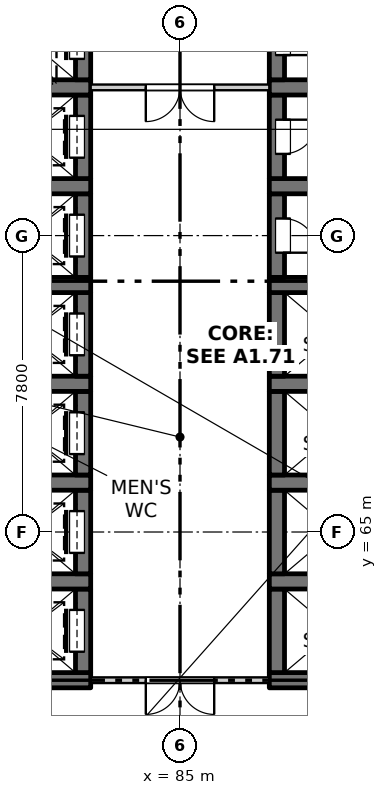
"""IFC4 building model, lengths in metres.
Left out: names, types, materials, properties, quantities, classifications, styles, units other than length and angle.
Written with IfcOpenShell. Run it as: python <this file> out.ifc"""

import sys

from ifc_helpers import new_model, si_unit, direction, frame, frame_2d, origin, place, context, subcontext, project, spatial, rectangle, extrude, element, fill, save


model = new_model("IFC4")
c1 = context("Model", 3, precision=1e-05, world=origin(), true_north=direction((0.0, 1.0)))
c2 = subcontext(c1, "Body", "Model", "MODEL_VIEW")
j1 = project(units=[si_unit("LENGTHUNIT", "METRE"), si_unit("PLANEANGLEUNIT", "RADIAN")], contexts=[c1])
p1 = place(None, origin())
s1 = spatial("IfcSite", under=j1, at=p1, CompositionType="ELEMENT")
p2 = place(p1, origin())
s2 = spatial("IfcBuilding", under=s1, at=p2, CompositionType="ELEMENT")
p3 = place(p2, frame((0.0, 0.0, 10.5)))
s3 = spatial("IfcBuildingStorey", under=s2, at=p3, CompositionType="ELEMENT", Elevation=10.5)
p4 = place(p3, frame((79.65, 61.1, -0.3), z_axis=(0.0, 0.0, 1.0), x_axis=(1.0, 0.0, 0.0)))
e1 = element("IfcWall", 1, at=p4, inside=s3, PredefinedType="SOLIDWALL", context=c2, shape_type="SweptSolid", body=[
    extrude(rectangle(XDim=3.0, YDim=0.4, at=frame_2d((1.5, 0.0))), origin(), (0.0, 0.0, 1.0), 4.45),
])
p5 = place(p3, frame((82.45, 61.3, -0.3), z_axis=(0.0, 0.0, 1.0), x_axis=(0.0, 1.0, 0.0)))
e2 = element("IfcWall", 2, at=p5, inside=s3, PredefinedType="SOLIDWALL", context=c2, shape_type="SweptSolid", body=[
    extrude(rectangle(XDim=2.2, YDim=0.4, at=frame_2d((1.1, 0.0))), origin(), (0.0, 0.0, 1.0), 4.45),
])
p6 = place(p5, frame((0.55, 0.0, 0.3)))
e3 = element("IfcOpeningElement", 3, at=p6, cuts=e2, PredefinedType="OPENING", context=c2, shape_type="SweptSolid", body=[
    extrude(rectangle(XDim=1.1, YDim=2.1, at=frame_2d((0.55, 1.05))), frame((0.0, 0.21, 0.0), z_axis=(0.0, -1.0, 0.0), x_axis=(1.0, 0.0, 0.0)), (0.0, 0.0, 1.0), 0.42),
])
p7 = place(p3, frame((79.65, 63.7, -0.3), z_axis=(0.0, 0.0, 1.0), x_axis=(1.0, 0.0, 0.0)))
e4 = element("IfcWall", 4, at=p7, inside=s3, PredefinedType="SOLIDWALL", context=c2, shape_type="SweptSolid", body=[
    extrude(rectangle(XDim=3.0, YDim=0.4, at=frame_2d((1.5, 0.0))), origin(), (0.0, 0.0, 1.0), 4.45),
])
p8 = place(p3, frame((82.45, 63.9, -0.3), z_axis=(0.0, 0.0, 1.0), x_axis=(0.0, 1.0, 0.0)))
e5 = element("IfcWall", 5, at=p8, inside=s3, PredefinedType="SOLIDWALL", context=c2, shape_type="SweptSolid", body=[
    extrude(rectangle(XDim=2.2, YDim=0.4, at=frame_2d((1.1, 0.0))), origin(), (0.0, 0.0, 1.0), 4.45),
])
p9 = place(p8, frame((0.55, 0.0, 0.3)))
e6 = element("IfcOpeningElement", 6, at=p9, cuts=e5, PredefinedType="OPENING", context=c2, shape_type="SweptSolid", body=[
    extrude(rectangle(XDim=1.1, YDim=2.1, at=frame_2d((0.55, 1.05))), frame((0.0, 0.21, 0.0), z_axis=(0.0, -1.0, 0.0), x_axis=(1.0, 0.0, 0.0)), (0.0, 0.0, 1.0), 0.42),
])
p10 = place(p3, frame((79.65, 66.3, -0.3), z_axis=(0.0, 0.0, 1.0), x_axis=(1.0, 0.0, 0.0)))
e7 = element("IfcWall", 7, at=p10, inside=s3, PredefinedType="SOLIDWALL", context=c2, shape_type="SweptSolid", body=[
    extrude(rectangle(XDim=3.0, YDim=0.4, at=frame_2d((1.5, 0.0))), origin(), (0.0, 0.0, 1.0), 4.45),
])
p11 = place(p3, frame((82.45, 66.5, -0.3), z_axis=(0.0, 0.0, 1.0), x_axis=(0.0, 1.0, 0.0)))
e8 = element("IfcWall", 8, at=p11, inside=s3, PredefinedType="SOLIDWALL", context=c2, shape_type="SweptSolid", body=[
    extrude(rectangle(XDim=2.2, YDim=0.4, at=frame_2d((1.1, 0.0))), origin(), (0.0, 0.0, 1.0), 4.45),
])
p12 = place(p11, frame((0.55, 0.0, 0.3)))
e9 = element("IfcOpeningElement", 9, at=p12, cuts=e8, PredefinedType="OPENING", context=c2, shape_type="SweptSolid", body=[
    extrude(rectangle(XDim=1.1, YDim=2.1, at=frame_2d((0.55, 1.05))), frame((0.0, 0.21, 0.0), z_axis=(0.0, -1.0, 0.0), x_axis=(1.0, 0.0, 0.0)), (0.0, 0.0, 1.0), 0.42),
])
p13 = place(p3, frame((79.65, 68.9, -0.3), z_axis=(0.0, 0.0, 1.0), x_axis=(1.0, 0.0, 0.0)))
e10 = element("IfcWall", 10, at=p13, inside=s3, PredefinedType="SOLIDWALL", context=c2, shape_type="SweptSolid", body=[
    extrude(rectangle(XDim=3.0, YDim=0.4, at=frame_2d((1.5, 0.0))), origin(), (0.0, 0.0, 1.0), 4.45),
])
p14 = place(p3, frame((82.45, 69.1, -0.3), z_axis=(0.0, 0.0, 1.0), x_axis=(0.0, 1.0, 0.0)))
e11 = element("IfcWall", 11, at=p14, inside=s3, PredefinedType="SOLIDWALL", context=c2, shape_type="SweptSolid", body=[
    extrude(rectangle(XDim=2.2, YDim=0.4, at=frame_2d((1.1, 0.0))), origin(), (0.0, 0.0, 1.0), 4.45),
])
p15 = place(p14, frame((0.55, 0.0, 0.3)))
e12 = element("IfcOpeningElement", 12, at=p15, cuts=e11, PredefinedType="OPENING", context=c2, shape_type="SweptSolid", body=[
    extrude(rectangle(XDim=1.1, YDim=2.1, at=frame_2d((0.55, 1.05))), frame((0.0, 0.21, 0.0), z_axis=(0.0, -1.0, 0.0), x_axis=(1.0, 0.0, 0.0)), (0.0, 0.0, 1.0), 0.42),
])
p16 = place(p3, frame((79.65, 71.5, -0.3), z_axis=(0.0, 0.0, 1.0), x_axis=(1.0, 0.0, 0.0)))
e13 = element("IfcWall", 13, at=p16, inside=s3, PredefinedType="SOLIDWALL", context=c2, shape_type="SweptSolid", body=[
    extrude(rectangle(XDim=3.0, YDim=0.4, at=frame_2d((1.5, 0.0))), origin(), (0.0, 0.0, 1.0), 4.45),
])
p17 = place(p3, frame((82.45, 71.7, -0.3), z_axis=(0.0, 0.0, 1.0), x_axis=(0.0, 1.0, 0.0)))
e14 = element("IfcWall", 14, at=p17, inside=s3, PredefinedType="SOLIDWALL", context=c2, shape_type="SweptSolid", body=[
    extrude(rectangle(XDim=2.2, YDim=0.4, at=frame_2d((1.1, 0.0))), origin(), (0.0, 0.0, 1.0), 4.45),
])
p18 = place(p17, frame((0.55, 0.0, 0.3)))
e15 = element("IfcOpeningElement", 15, at=p18, cuts=e14, PredefinedType="OPENING", context=c2, shape_type="SweptSolid", body=[
    extrude(rectangle(XDim=1.1, YDim=2.1, at=frame_2d((0.55, 1.05))), frame((0.0, 0.21, 0.0), z_axis=(0.0, -1.0, 0.0), x_axis=(1.0, 0.0, 0.0)), (0.0, 0.0, 1.0), 0.42),
])
p19 = place(p3, frame((79.65, 74.1, -0.3), z_axis=(0.0, 0.0, 1.0), x_axis=(1.0, 0.0, 0.0)))
e16 = element("IfcWall", 16, at=p19, inside=s3, PredefinedType="SOLIDWALL", context=c2, shape_type="SweptSolid", body=[
    extrude(rectangle(XDim=3.0, YDim=0.4, at=frame_2d((1.5, 0.0))), origin(), (0.0, 0.0, 1.0), 4.45),
])
p20 = place(p3, frame((82.45, 74.3, -0.3), z_axis=(0.0, 0.0, 1.0), x_axis=(0.0, 1.0, 0.0)))
e17 = element("IfcWall", 17, at=p20, inside=s3, PredefinedType="SOLIDWALL", context=c2, shape_type="SweptSolid", body=[
    extrude(rectangle(XDim=2.2, YDim=0.4, at=frame_2d((1.1, 0.0))), origin(), (0.0, 0.0, 1.0), 4.45),
])
p21 = place(p20, frame((0.55, 0.0, 0.3)))
e18 = element("IfcOpeningElement", 18, at=p21, cuts=e17, PredefinedType="OPENING", context=c2, shape_type="SweptSolid", body=[
    extrude(rectangle(XDim=1.1, YDim=2.1, at=frame_2d((0.55, 1.05))), frame((0.0, 0.21, 0.0), z_axis=(0.0, -1.0, 0.0), x_axis=(1.0, 0.0, 0.0)), (0.0, 0.0, 1.0), 0.42),
])
p22 = place(p3, frame((79.65, 76.7, -0.3), z_axis=(0.0, 0.0, 1.0), x_axis=(1.0, 0.0, 0.0)))
e19 = element("IfcWall", 19, at=p22, inside=s3, PredefinedType="SOLIDWALL", context=c2, shape_type="SweptSolid", body=[
    extrude(rectangle(XDim=3.0, YDim=0.4, at=frame_2d((1.5, 0.0))), origin(), (0.0, 0.0, 1.0), 4.45),
])
p23 = place(p3, frame((82.45, 76.9, -0.3), z_axis=(0.0, 0.0, 1.0), x_axis=(0.0, 1.0, 0.0)))
e20 = element("IfcWall", 20, at=p23, inside=s3, PredefinedType="SOLIDWALL", context=c2, shape_type="SweptSolid", body=[
    extrude(rectangle(XDim=2.2, YDim=0.4, at=frame_2d((1.1, 0.0))), origin(), (0.0, 0.0, 1.0), 4.45),
])
p24 = place(p23, frame((0.55, 0.0, 0.3)))
e21 = element("IfcOpeningElement", 21, at=p24, cuts=e20, PredefinedType="OPENING", context=c2, shape_type="SweptSolid", body=[
    extrude(rectangle(XDim=1.1, YDim=2.1, at=frame_2d((0.55, 1.05))), frame((0.0, 0.21, 0.0), z_axis=(0.0, -1.0, 0.0), x_axis=(1.0, 0.0, 0.0)), (0.0, 0.0, 1.0), 0.42),
])
p25 = place(p3, frame((87.35, 61.1, -0.3), z_axis=(0.0, 0.0, 1.0), x_axis=(1.0, 0.0, 0.0)))
e22 = element("IfcWall", 22, at=p25, inside=s3, PredefinedType="SOLIDWALL", context=c2, shape_type="SweptSolid", body=[
    extrude(rectangle(XDim=3.0, YDim=0.4, at=frame_2d((1.5, 0.0))), origin(), (0.0, 0.0, 1.0), 4.45),
])
p26 = place(p3, frame((87.55, 61.3, -0.3), z_axis=(0.0, 0.0, 1.0), x_axis=(0.0, 1.0, 0.0)))
e23 = element("IfcWall", 23, at=p26, inside=s3, PredefinedType="SOLIDWALL", context=c2, shape_type="SweptSolid", body=[
    extrude(rectangle(XDim=2.2, YDim=0.4, at=frame_2d((1.1, 0.0))), origin(), (0.0, 0.0, 1.0), 4.45),
])
p27 = place(p3, frame((87.35, 63.7, -0.3), z_axis=(0.0, 0.0, 1.0), x_axis=(1.0, 0.0, 0.0)))
e24 = element("IfcWall", 24, at=p27, inside=s3, PredefinedType="SOLIDWALL", context=c2, shape_type="SweptSolid", body=[
    extrude(rectangle(XDim=3.0, YDim=0.4, at=frame_2d((1.5, 0.0))), origin(), (0.0, 0.0, 1.0), 4.45),
])
p28 = place(p3, frame((87.55, 63.9, -0.3), z_axis=(0.0, 0.0, 1.0), x_axis=(0.0, 1.0, 0.0)))
e25 = element("IfcWall", 25, at=p28, inside=s3, PredefinedType="SOLIDWALL", context=c2, shape_type="SweptSolid", body=[
    extrude(rectangle(XDim=2.2, YDim=0.4, at=frame_2d((1.1, 0.0))), origin(), (0.0, 0.0, 1.0), 4.45),
])
p29 = place(p3, frame((87.35, 66.3, -0.3), z_axis=(0.0, 0.0, 1.0), x_axis=(1.0, 0.0, 0.0)))
e26 = element("IfcWall", 26, at=p29, inside=s3, PredefinedType="SOLIDWALL", context=c2, shape_type="SweptSolid", body=[
    extrude(rectangle(XDim=3.0, YDim=0.4, at=frame_2d((1.5, 0.0))), origin(), (0.0, 0.0, 1.0), 4.45),
])
p30 = place(p3, frame((87.55, 66.5, -0.3), z_axis=(0.0, 0.0, 1.0), x_axis=(0.0, 1.0, 0.0)))
e27 = element("IfcWall", 27, at=p30, inside=s3, PredefinedType="SOLIDWALL", context=c2, shape_type="SweptSolid", body=[
    extrude(rectangle(XDim=2.2, YDim=0.4, at=frame_2d((1.1, 0.0))), origin(), (0.0, 0.0, 1.0), 4.45),
])
p31 = place(p3, frame((87.35, 68.9, -0.3), z_axis=(0.0, 0.0, 1.0), x_axis=(1.0, 0.0, 0.0)))
e28 = element("IfcWall", 28, at=p31, inside=s3, PredefinedType="SOLIDWALL", context=c2, shape_type="SweptSolid", body=[
    extrude(rectangle(XDim=3.0, YDim=0.4, at=frame_2d((1.5, 0.0))), origin(), (0.0, 0.0, 1.0), 4.45),
])
p32 = place(p3, frame((87.55, 69.1, -0.3), z_axis=(0.0, 0.0, 1.0), x_axis=(0.0, 1.0, 0.0)))
e29 = element("IfcWall", 29, at=p32, inside=s3, PredefinedType="SOLIDWALL", context=c2, shape_type="SweptSolid", body=[
    extrude(rectangle(XDim=2.2, YDim=0.4, at=frame_2d((1.1, 0.0))), origin(), (0.0, 0.0, 1.0), 4.45),
])
p33 = place(p3, frame((87.35, 71.5, -0.3), z_axis=(0.0, 0.0, 1.0), x_axis=(1.0, 0.0, 0.0)))
e30 = element("IfcWall", 30, at=p33, inside=s3, PredefinedType="SOLIDWALL", context=c2, shape_type="SweptSolid", body=[
    extrude(rectangle(XDim=3.0, YDim=0.4, at=frame_2d((1.5, 0.0))), origin(), (0.0, 0.0, 1.0), 4.45),
])
p34 = place(p3, frame((87.55, 71.7, -0.3), z_axis=(0.0, 0.0, 1.0), x_axis=(0.0, 1.0, 0.0)))
e31 = element("IfcWall", 31, at=p34, inside=s3, PredefinedType="SOLIDWALL", context=c2, shape_type="SweptSolid", body=[
    extrude(rectangle(XDim=2.2, YDim=0.4, at=frame_2d((1.1, 0.0))), origin(), (0.0, 0.0, 1.0), 4.45),
])
p35 = place(p34, frame((0.65, 0.0, 0.3)))
e32 = element("IfcOpeningElement", 32, at=p35, cuts=e31, PredefinedType="OPENING", context=c2, shape_type="SweptSolid", body=[
    extrude(rectangle(XDim=0.9, YDim=2.1, at=frame_2d((0.45, 1.05))), frame((0.0, 0.21, 0.0), z_axis=(0.0, -1.0, 0.0), x_axis=(1.0, 0.0, 0.0)), (0.0, 0.0, 1.0), 0.42),
])
p36 = place(p3, frame((87.35, 74.1, -0.3), z_axis=(0.0, 0.0, 1.0), x_axis=(1.0, 0.0, 0.0)))
e33 = element("IfcWall", 33, at=p36, inside=s3, PredefinedType="SOLIDWALL", context=c2, shape_type="SweptSolid", body=[
    extrude(rectangle(XDim=3.0, YDim=0.4, at=frame_2d((1.5, 0.0))), origin(), (0.0, 0.0, 1.0), 4.45),
])
p37 = place(p3, frame((87.55, 74.3, -0.3), z_axis=(0.0, 0.0, 1.0), x_axis=(0.0, 1.0, 0.0)))
e34 = element("IfcWall", 34, at=p37, inside=s3, PredefinedType="SOLIDWALL", context=c2, shape_type="SweptSolid", body=[
    extrude(rectangle(XDim=2.2, YDim=0.4, at=frame_2d((1.1, 0.0))), origin(), (0.0, 0.0, 1.0), 4.45),
])
p38 = place(p37, frame((0.65, 0.0, 0.3)))
e35 = element("IfcOpeningElement", 35, at=p38, cuts=e34, PredefinedType="OPENING", context=c2, shape_type="SweptSolid", body=[
    extrude(rectangle(XDim=0.9, YDim=2.1, at=frame_2d((0.45, 1.05))), frame((0.0, 0.21, 0.0), z_axis=(0.0, -1.0, 0.0), x_axis=(1.0, 0.0, 0.0)), (0.0, 0.0, 1.0), 0.42),
])
p39 = place(p3, frame((87.35, 76.7, -0.3), z_axis=(0.0, 0.0, 1.0), x_axis=(1.0, 0.0, 0.0)))
e36 = element("IfcWall", 36, at=p39, inside=s3, PredefinedType="SOLIDWALL", context=c2, shape_type="SweptSolid", body=[
    extrude(rectangle(XDim=3.0, YDim=0.4, at=frame_2d((1.5, 0.0))), origin(), (0.0, 0.0, 1.0), 4.45),
])
p40 = place(p3, frame((87.55, 76.9, -0.3), z_axis=(0.0, 0.0, 1.0), x_axis=(0.0, 1.0, 0.0)))
e37 = element("IfcWall", 37, at=p40, inside=s3, PredefinedType="SOLIDWALL", context=c2, shape_type="SweptSolid", body=[
    extrude(rectangle(XDim=2.2, YDim=0.4, at=frame_2d((1.1, 0.0))), origin(), (0.0, 0.0, 1.0), 4.45),
])
p41 = place(p40, frame((0.65, 0.0, 0.3)))
e38 = element("IfcOpeningElement", 38, at=p41, cuts=e37, PredefinedType="OPENING", context=c2, shape_type="SweptSolid", body=[
    extrude(rectangle(XDim=0.9, YDim=2.1, at=frame_2d((0.45, 1.05))), frame((0.0, 0.21, 0.0), z_axis=(0.0, -1.0, 0.0), x_axis=(1.0, 0.0, 0.0)), (0.0, 0.0, 1.0), 0.42),
])
p42 = place(p3, frame((82.65, 61.1, 0.0), z_axis=(0.0, 0.0, 1.0), x_axis=(1.0, 0.0, 0.0)))
e39 = element("IfcWall", 39, at=p42, inside=s3, PredefinedType="PARTITIONING", context=c2, shape_type="SweptSolid", body=[
    extrude(rectangle(XDim=4.7, YDim=0.15, at=frame_2d((2.35, 0.0))), origin(), (0.0, 0.0, 1.0), 4.15),
])
p43 = place(p42, frame((1.45, 0.0, 0.0)))
e40 = element("IfcOpeningElement", 40, at=p43, cuts=e39, PredefinedType="OPENING", context=c2, shape_type="SweptSolid", body=[
    extrude(rectangle(XDim=1.8, YDim=2.1, at=frame_2d((0.9, 1.05))), frame((0.0, 0.085, 0.0), z_axis=(0.0, -1.0, 0.0), x_axis=(1.0, 0.0, 0.0)), (0.0, 0.0, 1.0), 0.17),
])
p44 = place(p3, frame((82.65, 76.7, 0.0), z_axis=(0.0, 0.0, 1.0), x_axis=(1.0, 0.0, 0.0)))
e41 = element("IfcWall", 41, at=p44, inside=s3, PredefinedType="PARTITIONING", context=c2, shape_type="SweptSolid", body=[
    extrude(rectangle(XDim=4.7, YDim=0.15, at=frame_2d((2.35, 0.0))), origin(), (0.0, 0.0, 1.0), 4.15),
])
p45 = place(p44, frame((1.45, 0.0, 0.0)))
e42 = element("IfcOpeningElement", 42, at=p45, cuts=e41, PredefinedType="OPENING", context=c2, shape_type="SweptSolid", body=[
    extrude(rectangle(XDim=1.8, YDim=2.1, at=frame_2d((0.9, 1.05))), frame((0.0, 0.085, 0.0), z_axis=(0.0, -1.0, 0.0), x_axis=(1.0, 0.0, 0.0)), (0.0, 0.0, 1.0), 0.17),
])
p46 = place(p43, origin())
e43 = element("IfcDoor", 43, at=p46, inside=s3, OperationType="DOUBLE_DOOR_SINGLE_SWING", PredefinedType="DOOR", context=c2, shape_type="SweptSolid", body=[
    extrude(rectangle(XDim=1.8, YDim=2.1, at=frame_2d((0.9, 1.05))), frame((0.0, 0.025, 0.0), z_axis=(0.0, -1.0, 0.0), x_axis=(1.0, 0.0, 0.0)), (0.0, 0.0, 1.0), 0.05),
])
fill(e40, e43)
p47 = place(p6, origin())
e44 = element("IfcDoor", 44, at=p47, inside=s3, OperationType="SLIDING_TO_RIGHT", PredefinedType="DOOR", context=c2, shape_type="SweptSolid", body=[
    extrude(rectangle(XDim=1.1, YDim=2.1, at=frame_2d((0.55, 1.05))), frame((0.0, 0.185, 0.0), z_axis=(0.0, -1.0, 0.0), x_axis=(1.0, 0.0, 0.0)), (0.0, 0.0, 1.0), 0.05),
])
fill(e3, e44)
p48 = place(p9, origin())
e45 = element("IfcDoor", 45, at=p48, inside=s3, OperationType="SLIDING_TO_RIGHT", PredefinedType="DOOR", context=c2, shape_type="SweptSolid", body=[
    extrude(rectangle(XDim=1.1, YDim=2.1, at=frame_2d((0.55, 1.05))), frame((0.0, 0.185, 0.0), z_axis=(0.0, -1.0, 0.0), x_axis=(1.0, 0.0, 0.0)), (0.0, 0.0, 1.0), 0.05),
])
fill(e6, e45)
p49 = place(p12, origin())
e46 = element("IfcDoor", 46, at=p49, inside=s3, OperationType="SLIDING_TO_RIGHT", PredefinedType="DOOR", context=c2, shape_type="SweptSolid", body=[
    extrude(rectangle(XDim=1.1, YDim=2.1, at=frame_2d((0.55, 1.05))), frame((0.0, 0.185, 0.0), z_axis=(0.0, -1.0, 0.0), x_axis=(1.0, 0.0, 0.0)), (0.0, 0.0, 1.0), 0.05),
])
fill(e9, e46)
p50 = place(p15, origin())
e47 = element("IfcDoor", 47, at=p50, inside=s3, OperationType="SLIDING_TO_LEFT", PredefinedType="DOOR", context=c2, shape_type="SweptSolid", body=[
    extrude(rectangle(XDim=1.1, YDim=2.1, at=frame_2d((0.55, 1.05))), frame((0.0, 0.185, 0.0), z_axis=(0.0, -1.0, 0.0), x_axis=(1.0, 0.0, 0.0)), (0.0, 0.0, 1.0), 0.05),
])
fill(e12, e47)
p51 = place(p18, origin())
e48 = element("IfcDoor", 48, at=p51, inside=s3, OperationType="SLIDING_TO_LEFT", PredefinedType="DOOR", context=c2, shape_type="SweptSolid", body=[
    extrude(rectangle(XDim=1.1, YDim=2.1, at=frame_2d((0.55, 1.05))), frame((0.0, 0.185, 0.0), z_axis=(0.0, -1.0, 0.0), x_axis=(1.0, 0.0, 0.0)), (0.0, 0.0, 1.0), 0.05),
])
fill(e15, e48)
p52 = place(p35, origin())
e49 = element("IfcDoor", 49, at=p52, inside=s3, OperationType="SINGLE_SWING_RIGHT", PredefinedType="DOOR", context=c2, shape_type="SweptSolid", body=[
    extrude(rectangle(XDim=0.9, YDim=2.1, at=frame_2d((0.45, 1.05))), frame((0.0, -0.135, 0.0), z_axis=(0.0, -1.0, 0.0), x_axis=(1.0, 0.0, 0.0)), (0.0, 0.0, 1.0), 0.05),
])
fill(e32, e49)
p53 = place(p21, origin())
e50 = element("IfcDoor", 50, at=p53, inside=s3, OperationType="SLIDING_TO_LEFT", PredefinedType="DOOR", context=c2, shape_type="SweptSolid", body=[
    extrude(rectangle(XDim=1.1, YDim=2.1, at=frame_2d((0.55, 1.05))), frame((0.0, 0.185, 0.0), z_axis=(0.0, -1.0, 0.0), x_axis=(1.0, 0.0, 0.0)), (0.0, 0.0, 1.0), 0.05),
])
fill(e18, e50)
p54 = place(p38, origin())
e51 = element("IfcDoor", 51, at=p54, inside=s3, OperationType="SINGLE_SWING_LEFT", PredefinedType="DOOR", context=c2, shape_type="SweptSolid", body=[
    extrude(rectangle(XDim=0.9, YDim=2.1, at=frame_2d((0.45, 1.05))), frame((0.0, -0.135, 0.0), z_axis=(0.0, -1.0, 0.0), x_axis=(1.0, 0.0, 0.0)), (0.0, 0.0, 1.0), 0.05),
])
fill(e35, e51)
p55 = place(p45, origin())
e52 = element("IfcDoor", 52, at=p55, inside=s3, OperationType="DOUBLE_DOOR_SINGLE_SWING", PredefinedType="DOOR", context=c2, shape_type="SweptSolid", body=[
    extrude(rectangle(XDim=1.8, YDim=2.1, at=frame_2d((0.9, 1.05))), frame((0.0, 0.025, 0.0), z_axis=(0.0, -1.0, 0.0), x_axis=(1.0, 0.0, 0.0)), (0.0, 0.0, 1.0), 0.05),
])
fill(e42, e52)
p56 = place(p24, origin())
e53 = element("IfcDoor", 53, at=p56, inside=s3, OperationType="SLIDING_TO_LEFT", PredefinedType="DOOR", context=c2, shape_type="SweptSolid", body=[
    extrude(rectangle(XDim=1.1, YDim=2.1, at=frame_2d((0.55, 1.05))), frame((0.0, 0.185, 0.0), z_axis=(0.0, -1.0, 0.0), x_axis=(1.0, 0.0, 0.0)), (0.0, 0.0, 1.0), 0.05),
])
fill(e21, e53)
p57 = place(p41, origin())
e54 = element("IfcDoor", 54, at=p57, inside=s3, OperationType="SINGLE_SWING_RIGHT", PredefinedType="DOOR", context=c2, shape_type="SweptSolid", body=[
    extrude(rectangle(XDim=0.9, YDim=2.1, at=frame_2d((0.45, 1.05))), frame((0.0, -0.135, 0.0), z_axis=(0.0, -1.0, 0.0), x_axis=(1.0, 0.0, 0.0)), (0.0, 0.0, 1.0), 0.05),
])
fill(e38, e54)
save(model, sys.argv[1])
